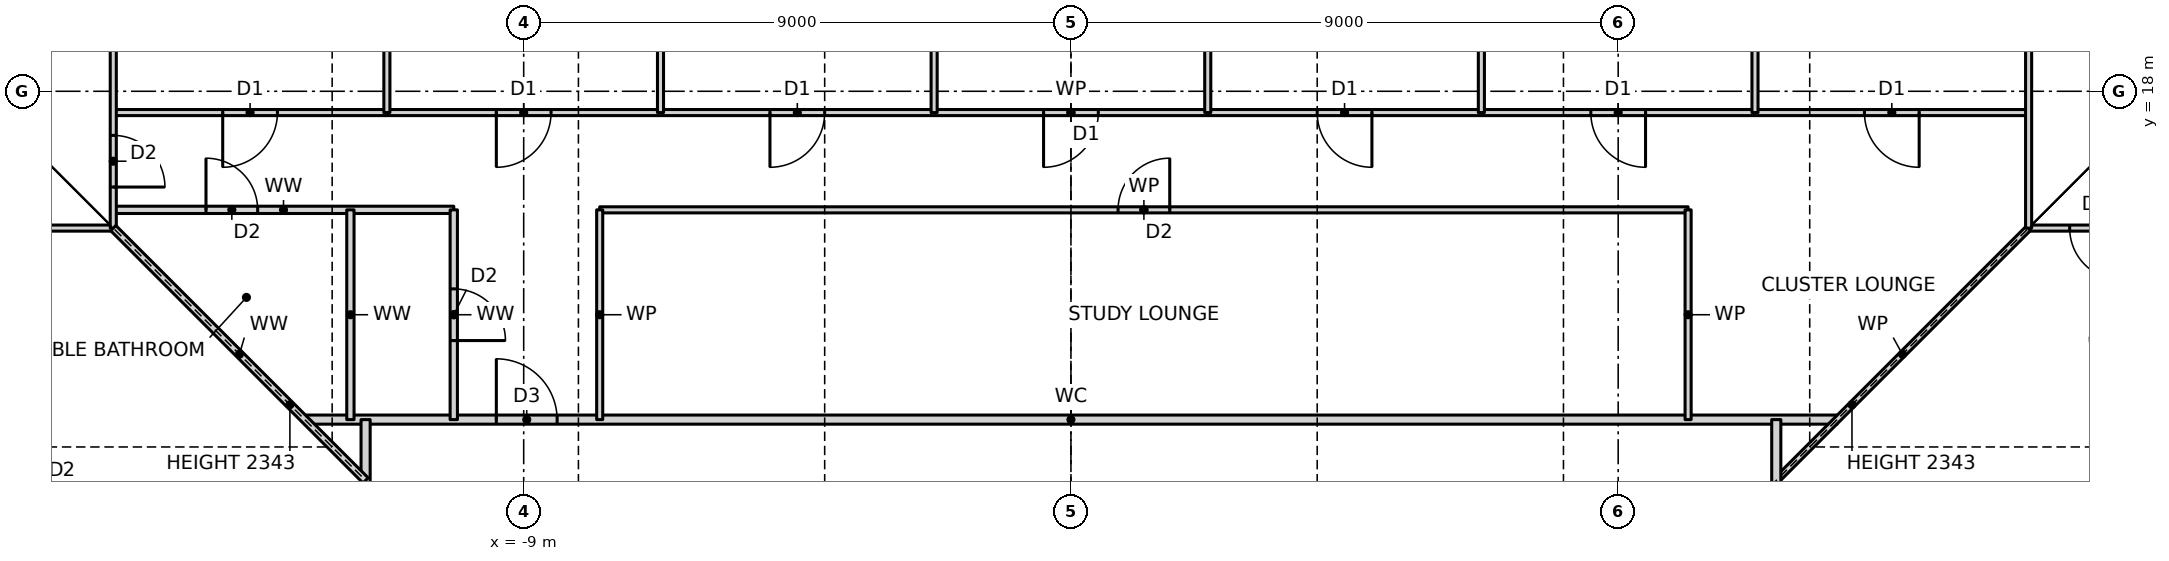
"""IFC4 building model, lengths in metres.
Left out: names, types, materials, properties, quantities, classifications, styles, units other than length and angle.
Written with IfcOpenShell. Run it as: python <this file> out.ifc"""

import sys

from ifc_helpers import new_model, si_unit, direction, frame, frame_2d, origin, place, context, subcontext, project, spatial, rectangle, extrude, element, fill, save


model = new_model("IFC4")
c1 = context("Model", 3, precision=1e-05, world=origin(), true_north=direction((0.0, 1.0)))
c2 = subcontext(c1, "Body", "Model", "MODEL_VIEW")
j1 = project(units=[si_unit("LENGTHUNIT", "METRE"), si_unit("PLANEANGLEUNIT", "RADIAN")], contexts=[c1])
p1 = place(None, origin())
s1 = spatial("IfcSite", under=j1, at=p1, CompositionType="ELEMENT")
p2 = place(p1, origin())
s2 = spatial("IfcBuilding", under=s1, at=p2, CompositionType="ELEMENT")
p3 = place(p2, frame((0.0, 0.0, 43.0)))
s3 = spatial("IfcBuildingStorey", under=s2, at=p3, CompositionType="ELEMENT", Elevation=43.0)
p4 = place(p3, frame((-12.6, 12.6, 0.0), z_axis=(0.0, 0.0, 1.0), x_axis=(1.0, 0.0, 0.0)))
e1 = element("IfcWall", 1, at=p4, inside=s3, PredefinedType="PARTITIONING", context=c2, shape_type="SweptSolid", body=[
    extrude(rectangle(XDim=25.2, YDim=0.15, at=frame_2d((12.6, 0.0))), origin(), (0.0, 0.0, 1.0), 3.27),
])
p5 = place(p4, frame((3.15, 0.0, 0.0)))
e2 = element("IfcOpeningElement", 2, at=p5, cuts=e1, PredefinedType="OPENING", context=c2, shape_type="SweptSolid", body=[
    extrude(rectangle(XDim=1.0, YDim=2.1, at=frame_2d((0.5, 1.05))), frame((0.0, 0.085, 0.0), z_axis=(0.0, -1.0, 0.0), x_axis=(1.0, 0.0, 0.0)), (0.0, 0.0, 1.0), 0.17),
])
p6 = place(p3, frame((-23.19, 15.75, 0.0), z_axis=(0.0, 0.0, 1.0), x_axis=(1.0, 0.0, 0.0)))
e3 = element("IfcWall", 3, at=p6, inside=s3, PredefinedType="PARTITIONING", context=c2, shape_type="SweptSolid", body=[
    extrude(rectangle(XDim=7.44, YDim=0.1, at=frame_2d((3.72, 0.0))), origin(), (0.0, 0.0, 1.0), 3.27),
])
p7 = place(p3, frame((15.75, 15.75, 0.0), z_axis=(0.0, 0.0, 1.0), x_axis=(1.0, 0.0, 0.0)))
e4 = element("IfcWall", 4, at=p7, inside=s3, PredefinedType="PARTITIONING", context=c2, shape_type="SweptSolid", body=[
    extrude(rectangle(XDim=7.44, YDim=0.1, at=frame_2d((3.72, 0.0))), origin(), (0.0, 0.0, 1.0), 3.27),
])
p8 = place(p7, frame((0.675, 0.0, 0.0)))
e5 = element("IfcOpeningElement", 5, at=p8, cuts=e4, PredefinedType="OPENING", context=c2, shape_type="SweptSolid", body=[
    extrude(rectangle(XDim=0.85, YDim=2.1, at=frame_2d((0.425, 1.05))), frame((0.0, 0.06, 0.0), z_axis=(0.0, -1.0, 0.0), x_axis=(1.0, 0.0, 0.0)), (0.0, 0.0, 1.0), 0.12),
])
p9 = place(p3, frame((-15.75, 16.05, 0.0), z_axis=(0.0, 0.0, 1.0), x_axis=(1.0, 0.0, 0.0)))
e6 = element("IfcWall", 6, at=p9, inside=s3, PredefinedType="PARTITIONING", context=c2, shape_type="SweptSolid", body=[
    extrude(rectangle(XDim=5.6, YDim=0.12, at=frame_2d((2.8, 0.0))), origin(), (0.0, 0.0, 1.0), 3.27),
])
p10 = place(p9, frame((1.525, 0.0, 0.0)))
e7 = element("IfcOpeningElement", 7, at=p10, cuts=e6, PredefinedType="OPENING", context=c2, shape_type="SweptSolid", body=[
    extrude(rectangle(XDim=0.85, YDim=2.1, at=frame_2d((0.425, 1.05))), frame((0.0, 0.07, 0.0), z_axis=(0.0, -1.0, 0.0), x_axis=(1.0, 0.0, 0.0)), (0.0, 0.0, 1.0), 0.14),
])
p11 = place(p3, frame((-7.75, 16.05, 0.0), z_axis=(0.0, 0.0, 1.0), x_axis=(1.0, 0.0, 0.0)))
e8 = element("IfcWall", 8, at=p11, inside=s3, PredefinedType="PARTITIONING", context=c2, shape_type="SweptSolid", body=[
    extrude(rectangle(XDim=17.9, YDim=0.1, at=frame_2d((8.95, 0.0))), origin(), (0.0, 0.0, 1.0), 3.27),
])
p12 = place(p11, frame((8.525, 0.0, 0.0)))
e9 = element("IfcOpeningElement", 9, at=p12, cuts=e8, PredefinedType="OPENING", context=c2, shape_type="SweptSolid", body=[
    extrude(rectangle(XDim=0.85, YDim=2.1, at=frame_2d((0.425, 1.05))), frame((0.0, 0.06, 0.0), z_axis=(0.0, -1.0, 0.0), x_axis=(1.0, 0.0, 0.0)), (0.0, 0.0, 1.0), 0.12),
])
p13 = place(p3, frame((-15.75, 17.65, 0.0), z_axis=(0.0, 0.0, 1.0), x_axis=(1.0, 0.0, 0.0)))
e10 = element("IfcWall", 10, at=p13, inside=s3, PredefinedType="PARTITIONING", context=c2, shape_type="SweptSolid", body=[
    extrude(rectangle(XDim=31.5, YDim=0.1, at=frame_2d((15.75, 0.0))), origin(), (0.0, 0.0, 1.0), 3.27),
])
p14 = place(p13, frame((28.8, 0.0, 0.0)))
e11 = element("IfcOpeningElement", 11, at=p14, cuts=e10, PredefinedType="OPENING", context=c2, shape_type="SweptSolid", body=[
    extrude(rectangle(XDim=0.9, YDim=2.1, at=frame_2d((0.45, 1.05))), frame((0.0, 0.06, 0.0), z_axis=(0.0, -1.0, 0.0), x_axis=(1.0, 0.0, 0.0)), (0.0, 0.0, 1.0), 0.12),
])
p15 = place(p13, frame((24.3, 0.0, 0.0)))
e12 = element("IfcOpeningElement", 12, at=p15, cuts=e10, PredefinedType="OPENING", context=c2, shape_type="SweptSolid", body=[
    extrude(rectangle(XDim=0.9, YDim=2.1, at=frame_2d((0.45, 1.05))), frame((0.0, 0.06, 0.0), z_axis=(0.0, -1.0, 0.0), x_axis=(1.0, 0.0, 0.0)), (0.0, 0.0, 1.0), 0.12),
])
p16 = place(p13, frame((19.8, 0.0, 0.0)))
e13 = element("IfcOpeningElement", 13, at=p16, cuts=e10, PredefinedType="OPENING", context=c2, shape_type="SweptSolid", body=[
    extrude(rectangle(XDim=0.9, YDim=2.1, at=frame_2d((0.45, 1.05))), frame((0.0, 0.06, 0.0), z_axis=(0.0, -1.0, 0.0), x_axis=(1.0, 0.0, 0.0)), (0.0, 0.0, 1.0), 0.12),
])
p17 = place(p13, frame((15.3, 0.0, 0.0)))
e14 = element("IfcOpeningElement", 14, at=p17, cuts=e10, PredefinedType="OPENING", context=c2, shape_type="SweptSolid", body=[
    extrude(rectangle(XDim=0.9, YDim=2.1, at=frame_2d((0.45, 1.05))), frame((0.0, 0.06, 0.0), z_axis=(0.0, -1.0, 0.0), x_axis=(1.0, 0.0, 0.0)), (0.0, 0.0, 1.0), 0.12),
])
p18 = place(p13, frame((10.8, 0.0, 0.0)))
e15 = element("IfcOpeningElement", 15, at=p18, cuts=e10, PredefinedType="OPENING", context=c2, shape_type="SweptSolid", body=[
    extrude(rectangle(XDim=0.9, YDim=2.1, at=frame_2d((0.45, 1.05))), frame((0.0, 0.06, 0.0), z_axis=(0.0, -1.0, 0.0), x_axis=(1.0, 0.0, 0.0)), (0.0, 0.0, 1.0), 0.12),
])
p19 = place(p13, frame((6.3, 0.0, 0.0)))
e16 = element("IfcOpeningElement", 16, at=p19, cuts=e10, PredefinedType="OPENING", context=c2, shape_type="SweptSolid", body=[
    extrude(rectangle(XDim=0.9, YDim=2.1, at=frame_2d((0.45, 1.05))), frame((0.0, 0.06, 0.0), z_axis=(0.0, -1.0, 0.0), x_axis=(1.0, 0.0, 0.0)), (0.0, 0.0, 1.0), 0.12),
])
p20 = place(p13, frame((1.8, 0.0, 0.0)))
e17 = element("IfcOpeningElement", 17, at=p20, cuts=e10, PredefinedType="OPENING", context=c2, shape_type="SweptSolid", body=[
    extrude(rectangle(XDim=0.9, YDim=2.1, at=frame_2d((0.45, 1.05))), frame((0.0, 0.06, 0.0), z_axis=(0.0, -1.0, 0.0), x_axis=(1.0, 0.0, 0.0)), (0.0, 0.0, 1.0), 0.12),
])
p21 = place(p3, frame((11.6, 11.6, 0.0), z_axis=(0.0, 0.0, 1.0), x_axis=(0.707106781187, 0.707106781187, 0.0)))
e18 = element("IfcWall", 18, at=p21, inside=s3, PredefinedType="PARTITIONING", context=c2, shape_type="SweptSolid", body=[
    extrude(rectangle(XDim=5.869, YDim=0.1, at=frame_2d((2.935, 0.0))), origin(), (0.0, 0.0, 1.0), 2.343),
])
p22 = place(p3, frame((15.75, 15.75, 0.0), z_axis=(0.0, 0.0, 1.0), x_axis=(0.0, 1.0, 0.0)))
e19 = element("IfcWall", 19, at=p22, inside=s3, PredefinedType="PARTITIONING", context=c2, shape_type="SweptSolid", body=[
    extrude(rectangle(XDim=7.44, YDim=0.1, at=frame_2d((3.72, 0.0))), origin(), (0.0, 0.0, 1.0), 3.27),
])
p23 = place(p3, frame((11.6, -11.6, 0.0), z_axis=(0.0, 0.0, 1.0), x_axis=(0.0, 1.0, 0.0)))
e20 = element("IfcWall", 20, at=p23, inside=s3, PredefinedType="PARTITIONING", context=c2, shape_type="SweptSolid", body=[
    extrude(rectangle(XDim=24.2, YDim=0.15, at=frame_2d((12.1, 0.0))), origin(), (0.0, 0.0, 1.0), 3.27),
])
p24 = place(p23, frame((3.6, 0.0, 0.0)))
e21 = element("IfcOpeningElement", 21, at=p24, cuts=e20, PredefinedType="OPENING", context=c2, shape_type="SweptSolid", body=[
    extrude(rectangle(XDim=1.0, YDim=2.1, at=frame_2d((0.5, 1.05))), frame((0.0, 0.085, 0.0), z_axis=(0.0, -1.0, 0.0), x_axis=(1.0, 0.0, 0.0)), (0.0, 0.0, 1.0), 0.17),
])
p25 = place(p23, frame((21.025, 0.0, 0.0)))
e22 = element("IfcOpeningElement", 22, at=p25, cuts=e20, PredefinedType="OPENING", context=c2, shape_type="SweptSolid", body=[
    extrude(rectangle(XDim=1.0, YDim=2.1, at=frame_2d((0.5, 1.05))), frame((0.0, 0.085, 0.0), z_axis=(0.0, -1.0, 0.0), x_axis=(1.0, 0.0, 0.0)), (0.0, 0.0, 1.0), 0.17),
])
p26 = place(p3, frame((11.25, 17.65, 0.0), z_axis=(0.0, 0.0, 1.0), x_axis=(0.0, 1.0, 0.0)))
e23 = element("IfcWall", 23, at=p26, inside=s3, PredefinedType="PARTITIONING", context=c2, shape_type="SweptSolid", body=[
    extrude(rectangle(XDim=5.54, YDim=0.1, at=frame_2d((2.77, 0.0))), origin(), (0.0, 0.0, 1.0), 3.27),
])
p27 = place(p3, frame((10.15, 12.6, 0.0), z_axis=(0.0, 0.0, 1.0), x_axis=(0.0, 1.0, 0.0)))
e24 = element("IfcWall", 24, at=p27, inside=s3, PredefinedType="PARTITIONING", context=c2, shape_type="SweptSolid", body=[
    extrude(rectangle(XDim=3.45, YDim=0.1, at=frame_2d((1.725, 0.0))), origin(), (0.0, 0.0, 1.0), 3.27),
])
for number, where, z_axis, x_axis in (
    (25, (6.75, 17.65, 0.0), (0.0, 0.0, 1.0), (0.0, 1.0, 0.0)),
    (26, (2.25, 17.65, 0.0), (0.0, 0.0, 1.0), (0.0, 1.0, 0.0)),
    (27, (-2.25, 17.65, 0.0), (0.0, 0.0, 1.0), (0.0, 1.0, 0.0)),
    (28, (-6.75, 17.65, 0.0), (0.0, 0.0, 1.0), (0.0, 1.0, 0.0)),
):
    element("IfcWall", number, at=place(p3, frame(where, z_axis=z_axis, x_axis=x_axis)), inside=s3, PredefinedType="PARTITIONING", context=c2, shape_type="SweptSolid", body=[
        extrude(rectangle(XDim=5.54, YDim=0.1, at=frame_2d((2.77, 0.0))), origin(), (0.0, 0.0, 1.0), 3.27),
    ])
p28 = place(p3, frame((-7.75, 12.6, 0.0), z_axis=(0.0, 0.0, 1.0), x_axis=(0.0, 1.0, 0.0)))
e29 = element("IfcWall", 29, at=p28, inside=s3, PredefinedType="PARTITIONING", context=c2, shape_type="SweptSolid", body=[
    extrude(rectangle(XDim=3.45, YDim=0.1, at=frame_2d((1.725, 0.0))), origin(), (0.0, 0.0, 1.0), 3.27),
])
p29 = place(p3, frame((-10.15, 12.6, 0.0), z_axis=(0.0, 0.0, 1.0), x_axis=(0.0, 1.0, 0.0)))
e30 = element("IfcWall", 30, at=p29, inside=s3, PredefinedType="PARTITIONING", context=c2, shape_type="SweptSolid", body=[
    extrude(rectangle(XDim=3.45, YDim=0.12, at=frame_2d((1.725, 0.0))), origin(), (0.0, 0.0, 1.0), 3.27),
])
p30 = place(p29, frame((1.3, 0.0, 0.0)))
e31 = element("IfcOpeningElement", 31, at=p30, cuts=e30, PredefinedType="OPENING", context=c2, shape_type="SweptSolid", body=[
    extrude(rectangle(XDim=0.85, YDim=2.1, at=frame_2d((0.425, 1.05))), frame((0.0, 0.07, 0.0), z_axis=(0.0, -1.0, 0.0), x_axis=(1.0, 0.0, 0.0)), (0.0, 0.0, 1.0), 0.14),
])
p31 = place(p3, frame((-11.25, 17.65, 0.0), z_axis=(0.0, 0.0, 1.0), x_axis=(0.0, 1.0, 0.0)))
e32 = element("IfcWall", 32, at=p31, inside=s3, PredefinedType="PARTITIONING", context=c2, shape_type="SweptSolid", body=[
    extrude(rectangle(XDim=5.54, YDim=0.1, at=frame_2d((2.77, 0.0))), origin(), (0.0, 0.0, 1.0), 3.27),
])
p32 = place(p3, frame((-11.6, -11.6, 0.0), z_axis=(0.0, 0.0, 1.0), x_axis=(0.0, 1.0, 0.0)))
e33 = element("IfcWall", 33, at=p32, inside=s3, PredefinedType="PARTITIONING", context=c2, shape_type="SweptSolid", body=[
    extrude(rectangle(XDim=24.2, YDim=0.15, at=frame_2d((12.1, 0.0))), origin(), (0.0, 0.0, 1.0), 3.27),
])
p33 = place(p32, frame((12.14, 0.0, 0.0)))
e34 = element("IfcOpeningElement", 34, at=p33, cuts=e33, PredefinedType="OPENING", context=c2, shape_type="SweptSolid", body=[
    extrude(rectangle(XDim=1.0, YDim=2.1, at=frame_2d((0.5, 1.05))), frame((0.0, 0.085, 0.0), z_axis=(0.0, -1.0, 0.0), x_axis=(1.0, 0.0, 0.0)), (0.0, 0.0, 1.0), 0.17),
])
p34 = place(p3, frame((-11.85, 12.6, 0.0), z_axis=(0.0, 0.0, 1.0), x_axis=(0.0, 1.0, 0.0)))
e35 = element("IfcWall", 35, at=p34, inside=s3, PredefinedType="PARTITIONING", context=c2, shape_type="SweptSolid", body=[
    extrude(rectangle(XDim=3.45, YDim=0.12, at=frame_2d((1.725, 0.0))), origin(), (0.0, 0.0, 1.0), 3.27),
])
p35 = place(p3, frame((-15.75, 15.75, 0.0), z_axis=(0.0, 0.0, 1.0), x_axis=(0.0, 1.0, 0.0)))
e36 = element("IfcWall", 36, at=p35, inside=s3, PredefinedType="PARTITIONING", context=c2, shape_type="SweptSolid", body=[
    extrude(rectangle(XDim=7.44, YDim=0.1, at=frame_2d((3.72, 0.0))), origin(), (0.0, 0.0, 1.0), 3.27),
])
p36 = place(p35, frame((0.675, 0.0, 0.0)))
e37 = element("IfcOpeningElement", 37, at=p36, cuts=e36, PredefinedType="OPENING", context=c2, shape_type="SweptSolid", body=[
    extrude(rectangle(XDim=0.85, YDim=2.1, at=frame_2d((0.425, 1.05))), frame((0.0, 0.06, 0.0), z_axis=(0.0, -1.0, 0.0), x_axis=(1.0, 0.0, 0.0)), (0.0, 0.0, 1.0), 0.12),
])
p37 = place(p3, frame((-11.6, 11.6, 0.0), z_axis=(0.0, 0.0, 1.0), x_axis=(-0.707106781187, 0.707106781187, 0.0)))
e38 = element("IfcWall", 38, at=p37, inside=s3, PredefinedType="PARTITIONING", context=c2, shape_type="SweptSolid", body=[
    extrude(rectangle(XDim=5.869, YDim=0.12, at=frame_2d((2.935, 0.0))), origin(), (0.0, 0.0, 1.0), 2.343),
])
p38 = place(p14, frame((0.9, 0.0, 0.0), z_axis=(0.0, 0.0, 1.0), x_axis=(-1.0, 0.0, 0.0)))
e39 = element("IfcDoor", 39, at=p38, inside=s3, OperationType="SINGLE_SWING_LEFT", PredefinedType="DOOR", context=c2, shape_type="SweptSolid", body=[
    extrude(rectangle(XDim=0.9, YDim=2.1, at=frame_2d((0.45, 1.05))), frame((0.0, 0.025, 0.0), z_axis=(0.0, -1.0, 0.0), x_axis=(1.0, 0.0, 0.0)), (0.0, 0.0, 1.0), 0.05),
])
fill(e11, e39)
p39 = place(p15, frame((0.9, 0.0, 0.0), z_axis=(0.0, 0.0, 1.0), x_axis=(-1.0, 0.0, 0.0)))
e40 = element("IfcDoor", 40, at=p39, inside=s3, OperationType="SINGLE_SWING_LEFT", PredefinedType="DOOR", context=c2, shape_type="SweptSolid", body=[
    extrude(rectangle(XDim=0.9, YDim=2.1, at=frame_2d((0.45, 1.05))), frame((0.0, 0.025, 0.0), z_axis=(0.0, -1.0, 0.0), x_axis=(1.0, 0.0, 0.0)), (0.0, 0.0, 1.0), 0.05),
])
fill(e12, e40)
p40 = place(p16, frame((0.9, 0.0, 0.0), z_axis=(0.0, 0.0, 1.0), x_axis=(-1.0, 0.0, 0.0)))
e41 = element("IfcDoor", 41, at=p40, inside=s3, OperationType="SINGLE_SWING_LEFT", PredefinedType="DOOR", context=c2, shape_type="SweptSolid", body=[
    extrude(rectangle(XDim=0.9, YDim=2.1, at=frame_2d((0.45, 1.05))), frame((0.0, 0.025, 0.0), z_axis=(0.0, -1.0, 0.0), x_axis=(1.0, 0.0, 0.0)), (0.0, 0.0, 1.0), 0.05),
])
fill(e13, e41)
p41 = place(p17, frame((0.9, 0.0, 0.0), z_axis=(0.0, 0.0, 1.0), x_axis=(-1.0, 0.0, 0.0)))
e42 = element("IfcDoor", 42, at=p41, inside=s3, OperationType="SINGLE_SWING_RIGHT", PredefinedType="DOOR", context=c2, shape_type="SweptSolid", body=[
    extrude(rectangle(XDim=0.9, YDim=2.1, at=frame_2d((0.45, 1.05))), frame((0.0, 0.025, 0.0), z_axis=(0.0, -1.0, 0.0), x_axis=(1.0, 0.0, 0.0)), (0.0, 0.0, 1.0), 0.05),
])
fill(e14, e42)
p42 = place(p18, frame((0.9, 0.0, 0.0), z_axis=(0.0, 0.0, 1.0), x_axis=(-1.0, 0.0, 0.0)))
e43 = element("IfcDoor", 43, at=p42, inside=s3, OperationType="SINGLE_SWING_RIGHT", PredefinedType="DOOR", context=c2, shape_type="SweptSolid", body=[
    extrude(rectangle(XDim=0.9, YDim=2.1, at=frame_2d((0.45, 1.05))), frame((0.0, 0.025, 0.0), z_axis=(0.0, -1.0, 0.0), x_axis=(1.0, 0.0, 0.0)), (0.0, 0.0, 1.0), 0.05),
])
fill(e15, e43)
p43 = place(p19, frame((0.9, 0.0, 0.0), z_axis=(0.0, 0.0, 1.0), x_axis=(-1.0, 0.0, 0.0)))
e44 = element("IfcDoor", 44, at=p43, inside=s3, OperationType="SINGLE_SWING_RIGHT", PredefinedType="DOOR", context=c2, shape_type="SweptSolid", body=[
    extrude(rectangle(XDim=0.9, YDim=2.1, at=frame_2d((0.45, 1.05))), frame((0.0, 0.025, 0.0), z_axis=(0.0, -1.0, 0.0), x_axis=(1.0, 0.0, 0.0)), (0.0, 0.0, 1.0), 0.05),
])
fill(e16, e44)
p44 = place(p20, frame((0.9, 0.0, 0.0), z_axis=(0.0, 0.0, 1.0), x_axis=(-1.0, 0.0, 0.0)))
e45 = element("IfcDoor", 45, at=p44, inside=s3, OperationType="SINGLE_SWING_RIGHT", PredefinedType="DOOR", context=c2, shape_type="SweptSolid", body=[
    extrude(rectangle(XDim=0.9, YDim=2.1, at=frame_2d((0.45, 1.05))), frame((0.0, 0.025, 0.0), z_axis=(0.0, -1.0, 0.0), x_axis=(1.0, 0.0, 0.0)), (0.0, 0.0, 1.0), 0.05),
])
fill(e17, e45)
p45 = place(p5, origin())
e46 = element("IfcDoor", 46, at=p45, inside=s3, OperationType="SINGLE_SWING_LEFT", PredefinedType="DOOR", context=c2, shape_type="SweptSolid", body=[
    extrude(rectangle(XDim=1.0, YDim=2.1, at=frame_2d((0.5, 1.05))), frame((0.0, 0.025, 0.0), z_axis=(0.0, -1.0, 0.0), x_axis=(1.0, 0.0, 0.0)), (0.0, 0.0, 1.0), 0.05),
])
fill(e2, e46)
p46 = place(p12, origin())
e47 = element("IfcDoor", 47, at=p46, inside=s3, OperationType="SINGLE_SWING_RIGHT", PredefinedType="DOOR", context=c2, shape_type="SweptSolid", body=[
    extrude(rectangle(XDim=0.85, YDim=2.1, at=frame_2d((0.425, 1.05))), frame((0.0, 0.025, 0.0), z_axis=(0.0, -1.0, 0.0), x_axis=(1.0, 0.0, 0.0)), (0.0, 0.0, 1.0), 0.05),
])
fill(e9, e47)
p47 = place(p30, frame((0.85, 0.0, 0.0), z_axis=(0.0, 0.0, 1.0), x_axis=(-1.0, 0.0, 0.0)))
e48 = element("IfcDoor", 48, at=p47, inside=s3, OperationType="SINGLE_SWING_RIGHT", PredefinedType="DOOR", context=c2, shape_type="SweptSolid", body=[
    extrude(rectangle(XDim=0.85, YDim=2.1, at=frame_2d((0.425, 1.05))), frame((0.0, 0.025, 0.0), z_axis=(0.0, -1.0, 0.0), x_axis=(1.0, 0.0, 0.0)), (0.0, 0.0, 1.0), 0.05),
])
fill(e31, e48)
p48 = place(p10, origin())
e49 = element("IfcDoor", 49, at=p48, inside=s3, OperationType="SINGLE_SWING_LEFT", PredefinedType="DOOR", context=c2, shape_type="SweptSolid", body=[
    extrude(rectangle(XDim=0.85, YDim=2.1, at=frame_2d((0.425, 1.05))), frame((0.0, 0.025, 0.0), z_axis=(0.0, -1.0, 0.0), x_axis=(1.0, 0.0, 0.0)), (0.0, 0.0, 1.0), 0.05),
])
fill(e7, e49)
p49 = place(p8, frame((0.85, 0.0, 0.0), z_axis=(0.0, 0.0, 1.0), x_axis=(-1.0, 0.0, 0.0)))
e50 = element("IfcDoor", 50, at=p49, inside=s3, OperationType="SINGLE_SWING_LEFT", PredefinedType="DOOR", context=c2, shape_type="SweptSolid", body=[
    extrude(rectangle(XDim=0.85, YDim=2.1, at=frame_2d((0.425, 1.05))), frame((0.0, 0.025, 0.0), z_axis=(0.0, -1.0, 0.0), x_axis=(1.0, 0.0, 0.0)), (0.0, 0.0, 1.0), 0.05),
])
fill(e5, e50)
p50 = place(p36, frame((0.85, 0.0, 0.0), z_axis=(0.0, 0.0, 1.0), x_axis=(-1.0, 0.0, 0.0)))
e51 = element("IfcDoor", 51, at=p50, inside=s3, OperationType="SINGLE_SWING_RIGHT", PredefinedType="DOOR", context=c2, shape_type="SweptSolid", body=[
    extrude(rectangle(XDim=0.85, YDim=2.1, at=frame_2d((0.425, 1.05))), frame((0.0, 0.025, 0.0), z_axis=(0.0, -1.0, 0.0), x_axis=(1.0, 0.0, 0.0)), (0.0, 0.0, 1.0), 0.05),
])
fill(e37, e51)
save(model, sys.argv[1])
